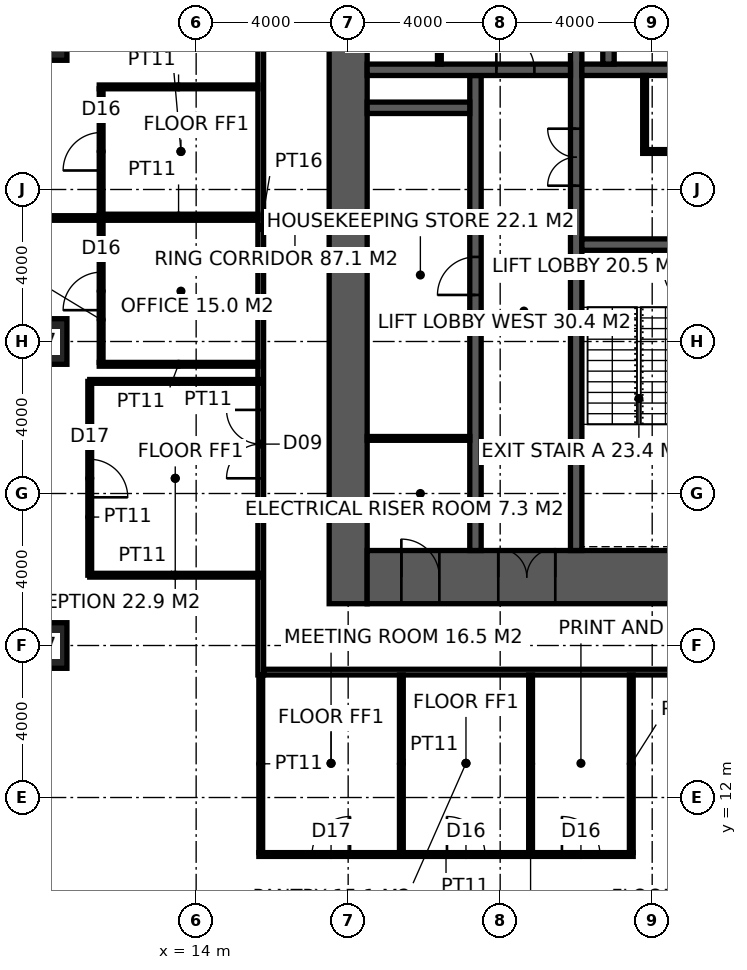
"""IFC4 building model, lengths in metres.
Left out: names, types, materials, properties, quantities, classifications, styles, units other than length and angle.
Written with IfcOpenShell. Run it as: python <this file> out.ifc"""

import sys

from ifc_helpers import new_model, si_unit, direction, frame, frame_2d, origin, origin_2d, place, context, subcontext, project, spatial, rectangle, hollow_rectangle, extrude, element, fill, save


model = new_model("IFC4")
c1 = context("Model", 3, precision=1e-05, world=origin(), true_north=direction((0.0, 1.0)))
c2 = subcontext(c1, "Body", "Model", "MODEL_VIEW")
j1 = project(units=[si_unit("LENGTHUNIT", "METRE"), si_unit("PLANEANGLEUNIT", "RADIAN")], contexts=[c1])
p1 = place(None, origin())
s1 = spatial("IfcSite", under=j1, at=p1, CompositionType="ELEMENT")
p2 = place(p1, origin())
s2 = spatial("IfcBuilding", under=s1, at=p2, CompositionType="ELEMENT")
p3 = place(p2, frame((0.0, 0.0, 19.0)))
s3 = spatial("IfcBuildingStorey", under=s2, at=p3, CompositionType="ELEMENT", Elevation=19.0)
for number, where, z_axis, x_axis in (
    (1, (10.0, 16.0, 0.0), (0.0, 0.0, 1.0), (1.0, 0.0, 0.0)),
    (2, (10.0, 24.0, 0.0), (0.0, 0.0, 1.0), (1.0, 0.0, 0.0)),
    (3, (10.0, 32.0, 0.0), (0.0, 0.0, 1.0), (1.0, 0.0, 0.0)),
):
    element("IfcColumn", number, at=place(p3, frame(where, z_axis=z_axis, x_axis=x_axis)), inside=s3, PredefinedType="COLUMN", context=c2, shape_type="SweptSolid", body=[
        extrude(hollow_rectangle(XDim=1.2, YDim=1.2, WallThickness=0.1, at=origin_2d()), origin(), (0.0, 0.0, 1.0), 4.0),
    ])
p4 = place(p3, frame((18.0, 17.1, -0.15), z_axis=(0.0, 0.0, 1.0), x_axis=(0.0, 1.0, 0.0)))
e4 = element("IfcWall", 4, at=p4, inside=s3, PredefinedType="SHEAR", context=c2, shape_type="SweptSolid", body=[
    extrude(rectangle(XDim=19.8, YDim=1.0, at=frame_2d((9.9, 0.0))), origin(), (0.0, 0.0, 1.0), 4.0),
])
p5 = place(p3, frame((18.5, 17.8, -0.15), z_axis=(0.0, 0.0, 1.0), x_axis=(1.0, 0.0, 0.0)))
e5 = element("IfcWall", 5, at=p5, inside=s3, PredefinedType="SHEAR", context=c2, shape_type="SweptSolid", body=[
    extrude(rectangle(XDim=23.0, YDim=1.4, at=frame_2d((11.5, 0.0))), origin(), (0.0, 0.0, 1.0), 4.0),
])
p6 = place(p5, frame((3.45, 0.0, 0.15)))
e6 = element("IfcOpeningElement", 6, at=p6, cuts=e5, PredefinedType="OPENING", context=c2, shape_type="SweptSolid", body=[
    extrude(rectangle(XDim=1.5, YDim=2.4, at=frame_2d((0.75, 1.2))), frame((0.0, 0.71, 0.0), z_axis=(0.0, -1.0, 0.0), x_axis=(1.0, 0.0, 0.0)), (0.0, 0.0, 1.0), 1.42),
])
p7 = place(p5, frame((17.9, 0.0, 0.15)))
e7 = element("IfcOpeningElement", 7, at=p7, cuts=e5, PredefinedType="OPENING", context=c2, shape_type="SweptSolid", body=[
    extrude(rectangle(XDim=1.5, YDim=2.4, at=frame_2d((0.75, 1.2))), frame((0.0, 0.71, 0.0), z_axis=(0.0, -1.0, 0.0), x_axis=(1.0, 0.0, 0.0)), (0.0, 0.0, 1.0), 1.42),
])
p8 = place(p5, frame((0.9, 0.0, 0.15)))
e8 = element("IfcOpeningElement", 8, at=p8, cuts=e5, PredefinedType="OPENING", context=c2, shape_type="SweptSolid", body=[
    extrude(rectangle(XDim=1.0, YDim=2.2, at=frame_2d((0.5, 1.1))), frame((0.0, 0.71, 0.0), z_axis=(0.0, -1.0, 0.0), x_axis=(1.0, 0.0, 0.0)), (0.0, 0.0, 1.0), 1.42),
])
p9 = place(p3, frame((24.0, 18.5, -0.15), z_axis=(0.0, 0.0, 1.0), x_axis=(0.0, 1.0, 0.0)))
e9 = element("IfcWall", 9, at=p9, inside=s3, PredefinedType="SHEAR", context=c2, shape_type="SweptSolid", body=[
    extrude(rectangle(XDim=17.0, YDim=0.3, at=frame_2d((8.5, 0.0))), origin(), (0.0, 0.0, 1.0), 4.0),
])
p10 = place(p9, frame((9.6, 0.0, 0.15)))
e10 = element("IfcOpeningElement", 10, at=p10, cuts=e9, PredefinedType="OPENING", context=c2, shape_type="SweptSolid", body=[
    extrude(rectangle(XDim=1.5, YDim=2.4, at=frame_2d((0.75, 1.2))), frame((0.0, 0.16, 0.0), z_axis=(0.0, -1.0, 0.0), x_axis=(1.0, 0.0, 0.0)), (0.0, 0.0, 1.0), 0.32),
])
p11 = place(p3, frame((24.15, 26.55, -0.15), z_axis=(0.0, 0.0, 1.0), x_axis=(1.0, 0.0, 0.0)))
e11 = element("IfcWall", 11, at=p11, inside=s3, PredefinedType="SHEAR", context=c2, shape_type="SweptSolid", body=[
    extrude(rectangle(XDim=11.25, YDim=0.3, at=frame_2d((5.625, 0.0))), origin(), (0.0, 0.0, 1.0), 4.0),
])
p12 = place(p11, frame((9.25, 0.0, 0.15)))
e12 = element("IfcOpeningElement", 12, at=p12, cuts=e11, PredefinedType="OPENING", context=c2, shape_type="SweptSolid", body=[
    extrude(rectangle(XDim=1.0, YDim=2.2, at=frame_2d((0.5, 1.1))), frame((0.0, 0.16, 0.0), z_axis=(0.0, -1.0, 0.0), x_axis=(1.0, 0.0, 0.0)), (0.0, 0.0, 1.0), 0.32),
])
p13 = place(p11, frame((4.9, 0.0, 0.15)))
e13 = element("IfcOpeningElement", 13, at=p13, cuts=e11, PredefinedType="OPENING", context=c2, shape_type="SweptSolid", body=[
    extrude(rectangle(XDim=1.5, YDim=2.4, at=frame_2d((0.75, 1.2))), frame((0.0, 0.16, 0.0), z_axis=(0.0, -1.0, 0.0), x_axis=(1.0, 0.0, 0.0)), (0.0, 0.0, 1.0), 0.32),
])
p14 = place(p3, frame((24.15, 31.15, -0.15), z_axis=(0.0, 0.0, 1.0), x_axis=(1.0, 0.0, 0.0)))
e14 = element("IfcWall", 14, at=p14, inside=s3, PredefinedType="SHEAR", context=c2, shape_type="SweptSolid", body=[
    extrude(rectangle(XDim=11.25, YDim=0.3, at=frame_2d((5.625, 0.0))), origin(), (0.0, 0.0, 1.0), 4.0),
])
p15 = place(p14, frame((7.25, 0.0, 0.15)))
e15 = element("IfcOpeningElement", 15, at=p15, cuts=e14, PredefinedType="OPENING", context=c2, shape_type="SweptSolid", body=[
    extrude(rectangle(XDim=1.4, YDim=2.4, at=frame_2d((0.7, 1.2))), frame((0.0, 0.16, 0.0), z_axis=(0.0, -1.0, 0.0), x_axis=(1.0, 0.0, 0.0)), (0.0, 0.0, 1.0), 0.32),
])
p16 = place(p3, frame((21.35, 18.5, -0.15), z_axis=(0.0, 0.0, 1.0), x_axis=(0.0, 1.0, 0.0)))
e16 = element("IfcWall", 16, at=p16, inside=s3, PredefinedType="SHEAR", context=c2, shape_type="SweptSolid", body=[
    extrude(rectangle(XDim=12.5, YDim=0.3, at=frame_2d((6.25, 0.0))), origin(), (0.0, 0.0, 1.0), 4.0),
])
p17 = place(p16, frame((6.725, 0.0, 0.15)))
e17 = element("IfcOpeningElement", 17, at=p17, cuts=e16, PredefinedType="OPENING", context=c2, shape_type="SweptSolid", body=[
    extrude(rectangle(XDim=1.0, YDim=2.2, at=frame_2d((0.5, 1.1))), frame((0.0, 0.16, 0.0), z_axis=(0.0, -1.0, 0.0), x_axis=(1.0, 0.0, 0.0)), (0.0, 0.0, 1.0), 0.32),
])
p18 = place(p3, frame((18.5, 31.15, -0.15), z_axis=(0.0, 0.0, 1.0), x_axis=(1.0, 0.0, 0.0)))
e18 = element("IfcWall", 18, at=p18, inside=s3, PredefinedType="SHEAR", context=c2, shape_type="SweptSolid", body=[
    extrude(rectangle(XDim=5.35, YDim=0.3, at=frame_2d((2.675, 0.0))), origin(), (0.0, 0.0, 1.0), 4.0),
])
p19 = place(p18, frame((3.4, 0.0, 0.15)))
e19 = element("IfcOpeningElement", 19, at=p19, cuts=e18, PredefinedType="OPENING", context=c2, shape_type="SweptSolid", body=[
    extrude(rectangle(XDim=1.0, YDim=2.2, at=frame_2d((0.5, 1.1))), frame((0.0, 0.16, 0.0), z_axis=(0.0, -1.0, 0.0), x_axis=(1.0, 0.0, 0.0)), (0.0, 0.0, 1.0), 0.32),
])
p20 = place(p3, frame((18.5, 30.15, -0.15), z_axis=(0.0, 0.0, 1.0), x_axis=(1.0, 0.0, 0.0)))
e20 = element("IfcWall", 20, at=p20, inside=s3, PredefinedType="SHEAR", context=c2, shape_type="SweptSolid", body=[
    extrude(rectangle(XDim=2.7, YDim=0.3, at=frame_2d((1.35, 0.0))), origin(), (0.0, 0.0, 1.0), 4.0),
])
p21 = place(p3, frame((24.85, 31.3, -0.15), z_axis=(0.0, 0.0, 1.0), x_axis=(0.0, 1.0, 0.0)))
e21 = element("IfcWall", 21, at=p21, inside=s3, PredefinedType="SHEAR", context=c2, shape_type="SweptSolid", body=[
    extrude(rectangle(XDim=4.2, YDim=0.3, at=frame_2d((2.1, 0.0))), origin(), (0.0, 0.0, 1.0), 4.0),
])
p22 = place(p3, frame((20.4, 31.3, 0.0), z_axis=(0.0, 0.0, 1.0), x_axis=(0.0, 1.0, 0.0)))
e22 = element("IfcWall", 22, at=p22, inside=s3, PredefinedType="PARTITIONING", context=c2, shape_type="SweptSolid", body=[
    extrude(rectangle(XDim=4.2, YDim=0.1, at=frame_2d((2.1, 0.0))), origin(), (0.0, 0.0, 1.0), 3.85),
])
p23 = place(p22, frame((1.55, 0.0, 0.0)))
e23 = element("IfcOpeningElement", 23, at=p23, cuts=e22, PredefinedType="OPENING", context=c2, shape_type="SweptSolid", body=[
    extrude(rectangle(XDim=1.0, YDim=2.2, at=frame_2d((0.5, 1.1))), frame((0.0, 0.06, 0.0), z_axis=(0.0, -1.0, 0.0), x_axis=(1.0, 0.0, 0.0)), (0.0, 0.0, 1.0), 0.12),
])
p24 = place(p3, frame((25.75, 29.0, 0.0), z_axis=(0.0, 0.0, 1.0), x_axis=(1.0, 0.0, 0.0)))
e24 = element("IfcWall", 24, at=p24, inside=s3, PredefinedType="PARTITIONING", context=c2, shape_type="SweptSolid", body=[
    extrude(rectangle(XDim=4.7, YDim=0.1, at=frame_2d((2.35, 0.0))), origin(), (0.0, 0.0, 1.0), 3.85),
])
p25 = place(p24, frame((1.85, 0.0, 0.0)))
e25 = element("IfcOpeningElement", 25, at=p25, cuts=e24, PredefinedType="OPENING", context=c2, shape_type="SweptSolid", body=[
    extrude(rectangle(XDim=1.0, YDim=2.2, at=frame_2d((0.5, 1.1))), frame((0.0, 0.06, 0.0), z_axis=(0.0, -1.0, 0.0), x_axis=(1.0, 0.0, 0.0)), (0.0, 0.0, 1.0), 0.12),
])
p26 = place(p3, frame((25.8, 29.05, 0.0), z_axis=(0.0, 0.0, 1.0), x_axis=(0.0, 1.0, 0.0)))
e26 = element("IfcWall", 26, at=p26, inside=s3, PredefinedType="PARTITIONING", context=c2, shape_type="SweptSolid", body=[
    extrude(rectangle(XDim=1.95, YDim=0.1, at=frame_2d((0.975, 0.0))), origin(), (0.0, 0.0, 1.0), 3.85),
])
p27 = place(p3, frame((18.5, 21.45, 0.0), z_axis=(0.0, 0.0, 1.0), x_axis=(1.0, 0.0, 0.0)))
e27 = element("IfcWall", 27, at=p27, inside=s3, PredefinedType="PARTITIONING", context=c2, shape_type="SweptSolid", body=[
    extrude(rectangle(XDim=2.7, YDim=0.1, at=frame_2d((1.35, 0.0))), origin(), (0.0, 0.0, 1.0), 3.85),
])
p28 = place(p3, frame((15.7, 15.225, 0.0), z_axis=(0.0, 0.0, 1.0), x_axis=(0.0, 1.0, 0.0)))
e28 = element("IfcWall", 28, at=p28, inside=s3, PredefinedType="PARTITIONING", context=c2, shape_type="SweptSolid", body=[
    extrude(rectangle(XDim=23.55, YDim=0.15, at=frame_2d((11.775, 0.0))), origin(), (0.0, 0.0, 1.0), 3.85),
])
p29 = place(p28, frame((5.175, 0.0, 0.0)))
e29 = element("IfcOpeningElement", 29, at=p29, cuts=e28, PredefinedType="OPENING", context=c2, shape_type="SweptSolid", body=[
    extrude(rectangle(XDim=1.8, YDim=2.4, at=frame_2d((0.9, 1.2))), frame((0.0, 0.085, 0.0), z_axis=(0.0, -1.0, 0.0), x_axis=(1.0, 0.0, 0.0)), (0.0, 0.0, 1.0), 0.17),
])
p30 = place(p28, frame((16.825, 0.0, 0.0)))
e30 = element("IfcOpeningElement", 30, at=p30, cuts=e28, PredefinedType="OPENING", context=c2, shape_type="SweptSolid", body=[
    extrude(rectangle(XDim=1.8, YDim=2.4, at=frame_2d((0.9, 1.2))), frame((0.0, 0.085, 0.0), z_axis=(0.0, -1.0, 0.0), x_axis=(1.0, 0.0, 0.0)), (0.0, 0.0, 1.0), 0.17),
])
p31 = place(p3, frame((15.775, 15.3, 0.0), z_axis=(0.0, 0.0, 1.0), x_axis=(1.0, 0.0, 0.0)))
e31 = element("IfcWall", 31, at=p31, inside=s3, PredefinedType="PARTITIONING", context=c2, shape_type="SweptSolid", body=[
    extrude(rectangle(XDim=28.45, YDim=0.15, at=frame_2d((14.225, 0.0))), origin(), (0.0, 0.0, 1.0), 3.85),
])
p32 = place(p3, frame((-1.7, 27.25, 0.0), z_axis=(0.0, 0.0, 1.0), x_axis=(1.0, 0.0, 0.0)))
e32 = element("IfcWall", 32, at=p32, inside=s3, PredefinedType="PARTITIONING", context=c2, shape_type="SweptSolid", body=[
    extrude(rectangle(XDim=17.325, YDim=0.12, at=frame_2d((8.663, 0.0))), origin(), (0.0, 0.0, 1.0), 3.85),
])
p33 = place(p3, frame((15.65, 10.5, 0.0), z_axis=(0.0, 0.0, 1.0), x_axis=(1.0, 0.0, 0.0)))
e33 = element("IfcWall", 33, at=p33, inside=s3, PredefinedType="PARTITIONING", context=c2, shape_type="SweptSolid", body=[
    extrude(rectangle(XDim=9.85, YDim=0.1, at=frame_2d((4.925, 0.0))), origin(), (0.0, 0.0, 1.0), 3.85),
])
p34 = place(p33, frame((1.4, 0.0, 0.0)))
e34 = element("IfcOpeningElement", 34, at=p34, cuts=e33, PredefinedType="OPENING", context=c2, shape_type="SweptSolid", body=[
    extrude(rectangle(XDim=1.0, YDim=2.2, at=frame_2d((0.5, 1.1))), frame((0.0, 0.06, 0.0), z_axis=(0.0, -1.0, 0.0), x_axis=(1.0, 0.0, 0.0)), (0.0, 0.0, 1.0), 0.12),
])
p35 = place(p33, frame((4.95, 0.0, 0.0)))
e35 = element("IfcOpeningElement", 35, at=p35, cuts=e33, PredefinedType="OPENING", context=c2, shape_type="SweptSolid", body=[
    extrude(rectangle(XDim=1.0, YDim=2.2, at=frame_2d((0.5, 1.1))), frame((0.0, 0.06, 0.0), z_axis=(0.0, -1.0, 0.0), x_axis=(1.0, 0.0, 0.0)), (0.0, 0.0, 1.0), 0.12),
])
p36 = place(p33, frame((7.975, 0.0, 0.0)))
e36 = element("IfcOpeningElement", 36, at=p36, cuts=e33, PredefinedType="OPENING", context=c2, shape_type="SweptSolid", body=[
    extrude(rectangle(XDim=1.0, YDim=2.2, at=frame_2d((0.5, 1.1))), frame((0.0, 0.06, 0.0), z_axis=(0.0, -1.0, 0.0), x_axis=(1.0, 0.0, 0.0)), (0.0, 0.0, 1.0), 0.12),
])
for number, where, z_axis, x_axis in (
    (37, (11.45, 23.4, 0.0), (0.0, 0.0, 1.0), (1.0, 0.0, 0.0)),
    (38, (11.45, 27.3, 0.0), (0.0, 0.0, 1.0), (1.0, 0.0, 0.0)),
    (39, (11.45, 30.7, 0.0), (0.0, 0.0, 1.0), (1.0, 0.0, 0.0)),
):
    element("IfcWall", number, at=place(p3, frame(where, z_axis=z_axis, x_axis=x_axis)), inside=s3, PredefinedType="PARTITIONING", context=c2, shape_type="SweptSolid", body=[
        extrude(rectangle(XDim=4.175, YDim=0.1, at=frame_2d((2.087, 0.0))), origin(), (0.0, 0.0, 1.0), 3.85),
    ])
p37 = place(p3, frame((11.5, 23.45, 0.0), z_axis=(0.0, 0.0, 1.0), x_axis=(0.0, 1.0, 0.0)))
e40 = element("IfcWall", 40, at=p37, inside=s3, PredefinedType="PARTITIONING", context=c2, shape_type="SweptSolid", body=[
    extrude(rectangle(XDim=3.739, YDim=0.1, at=frame_2d((1.87, 0.0))), origin(), (0.0, 0.0, 1.0), 3.85),
])
p38 = place(p37, frame((1.375, 0.0, 0.0)))
e41 = element("IfcOpeningElement", 41, at=p38, cuts=e40, PredefinedType="OPENING", context=c2, shape_type="SweptSolid", body=[
    extrude(rectangle(XDim=1.0, YDim=2.2, at=frame_2d((0.5, 1.1))), frame((0.0, 0.06, 0.0), z_axis=(0.0, -1.0, 0.0), x_axis=(1.0, 0.0, 0.0)), (0.0, 0.0, 1.0), 0.12),
])
p39 = place(p3, frame((11.5, 27.35, 0.0), z_axis=(0.0, 0.0, 1.0), x_axis=(0.0, 1.0, 0.0)))
e42 = element("IfcWall", 42, at=p39, inside=s3, PredefinedType="PARTITIONING", context=c2, shape_type="SweptSolid", body=[
    extrude(rectangle(XDim=3.3, YDim=0.1, at=frame_2d((1.65, 0.0))), origin(), (0.0, 0.0, 1.0), 3.85),
])
p40 = place(p39, frame((1.15, 0.0, 0.0)))
e43 = element("IfcOpeningElement", 43, at=p40, cuts=e42, PredefinedType="OPENING", context=c2, shape_type="SweptSolid", body=[
    extrude(rectangle(XDim=1.0, YDim=2.2, at=frame_2d((0.5, 1.1))), frame((0.0, 0.06, 0.0), z_axis=(0.0, -1.0, 0.0), x_axis=(1.0, 0.0, 0.0)), (0.0, 0.0, 1.0), 0.12),
])
for number, where, z_axis, x_axis in (
    (44, (15.7, 10.55, 0.0), (0.0, 0.0, 1.0), (0.0, 1.0, 0.0)),
    (45, (19.4, 10.55, 0.0), (0.0, 0.0, 1.0), (0.0, 1.0, 0.0)),
    (46, (22.8, 10.55, 0.0), (0.0, 0.0, 1.0), (0.0, 1.0, 0.0)),
    (47, (25.45, 10.55, 0.0), (0.0, 0.0, 1.0), (0.0, 1.0, 0.0)),
):
    element("IfcWall", number, at=place(p3, frame(where, z_axis=z_axis, x_axis=x_axis)), inside=s3, PredefinedType="PARTITIONING", context=c2, shape_type="SweptSolid", body=[
        extrude(rectangle(XDim=4.675, YDim=0.1, at=frame_2d((2.337, 0.0))), origin(), (0.0, 0.0, 1.0), 3.85),
    ])
p41 = place(p3, frame((15.7, 22.95, 0.0), z_axis=(0.0, 0.0, 1.0), x_axis=(-1.0, 0.0, 0.0)))
e48 = element("IfcWall", 48, at=p41, inside=s3, PredefinedType="PARTITIONING", context=c2, shape_type="SweptSolid", body=[
    extrude(rectangle(XDim=4.5, YDim=0.1, at=frame_2d((2.25, 0.0))), origin(), (0.0, 0.0, 1.0), 3.85),
])
p42 = place(p3, frame((11.2, 22.95, 0.0), z_axis=(0.0, 0.0, 1.0), x_axis=(0.0, -1.0, 0.0)))
e49 = element("IfcWall", 49, at=p42, inside=s3, PredefinedType="PARTITIONING", context=c2, shape_type="SweptSolid", body=[
    extrude(rectangle(XDim=5.1, YDim=0.1, at=frame_2d((2.55, 0.0))), origin(), (0.0, 0.0, 1.0), 3.85),
])
p43 = place(p42, frame((2.05, 0.0, 0.0)))
e50 = element("IfcOpeningElement", 50, at=p43, cuts=e49, PredefinedType="OPENING", context=c2, shape_type="SweptSolid", body=[
    extrude(rectangle(XDim=1.0, YDim=2.2, at=frame_2d((0.5, 1.1))), frame((0.0, 0.06, 0.0), z_axis=(0.0, -1.0, 0.0), x_axis=(1.0, 0.0, 0.0)), (0.0, 0.0, 1.0), 0.12),
])
p44 = place(p3, frame((11.2, 17.85, 0.0), z_axis=(0.0, 0.0, 1.0), x_axis=(1.0, 0.0, 0.0)))
e51 = element("IfcWall", 51, at=p44, inside=s3, PredefinedType="PARTITIONING", context=c2, shape_type="SweptSolid", body=[
    extrude(rectangle(XDim=4.5, YDim=0.1, at=frame_2d((2.25, 0.0))), origin(), (0.0, 0.0, 1.0), 3.85),
])
p45 = place(p10, origin())
e52 = element("IfcDoor", 52, at=p45, inside=s3, OperationType="DOUBLE_DOOR_DOUBLE_SWING", PredefinedType="DOOR", context=c2, shape_type="SweptSolid", body=[
    extrude(rectangle(XDim=1.5, YDim=2.4, at=frame_2d((0.75, 1.2))), frame((0.0, 0.025, 0.0), z_axis=(0.0, -1.0, 0.0), x_axis=(1.0, 0.0, 0.0)), (0.0, 0.0, 1.0), 0.05),
])
fill(e10, e52)
p46 = place(p19, origin())
e53 = element("IfcDoor", 53, at=p46, inside=s3, OperationType="SINGLE_SWING_LEFT", PredefinedType="DOOR", context=c2, shape_type="SweptSolid", body=[
    extrude(rectangle(XDim=1.0, YDim=2.2, at=frame_2d((0.5, 1.1))), frame((0.0, 0.025, 0.0), z_axis=(0.0, -1.0, 0.0), x_axis=(1.0, 0.0, 0.0)), (0.0, 0.0, 1.0), 0.05),
])
fill(e19, e53)
p47 = place(p17, origin())
e54 = element("IfcDoor", 54, at=p47, inside=s3, OperationType="SINGLE_SWING_LEFT", PredefinedType="DOOR", context=c2, shape_type="SweptSolid", body=[
    extrude(rectangle(XDim=1.0, YDim=2.2, at=frame_2d((0.5, 1.1))), frame((0.0, 0.025, 0.0), z_axis=(0.0, -1.0, 0.0), x_axis=(1.0, 0.0, 0.0)), (0.0, 0.0, 1.0), 0.05),
])
fill(e17, e54)
p48 = place(p6, origin())
e55 = element("IfcDoor", 55, at=p48, inside=s3, OperationType="DOUBLE_DOOR_DOUBLE_SWING", PredefinedType="DOOR", context=c2, shape_type="SweptSolid", body=[
    extrude(rectangle(XDim=1.5, YDim=2.4, at=frame_2d((0.75, 1.2))), frame((0.0, 0.025, 0.0), z_axis=(0.0, -1.0, 0.0), x_axis=(1.0, 0.0, 0.0)), (0.0, 0.0, 1.0), 0.05),
])
fill(e6, e55)
p49 = place(p8, origin())
e56 = element("IfcDoor", 56, at=p49, inside=s3, OperationType="SINGLE_SWING_LEFT", PredefinedType="DOOR", context=c2, shape_type="SweptSolid", body=[
    extrude(rectangle(XDim=1.0, YDim=2.2, at=frame_2d((0.5, 1.1))), frame((0.0, 0.025, 0.0), z_axis=(0.0, -1.0, 0.0), x_axis=(1.0, 0.0, 0.0)), (0.0, 0.0, 1.0), 0.05),
])
fill(e8, e56)
p50 = place(p29, origin())
e57 = element("IfcDoor", 57, at=p50, inside=s3, OperationType="DOUBLE_DOOR_DOUBLE_SWING", PredefinedType="DOOR", context=c2, shape_type="SweptSolid", body=[
    extrude(rectangle(XDim=1.8, YDim=2.4, at=frame_2d((0.9, 1.2))), frame((0.0, 0.025, 0.0), z_axis=(0.0, -1.0, 0.0), x_axis=(1.0, 0.0, 0.0)), (0.0, 0.0, 1.0), 0.05),
])
fill(e29, e57)
p51 = place(p34, origin())
e58 = element("IfcDoor", 58, at=p51, inside=s3, OperationType="SINGLE_SWING_RIGHT", PredefinedType="DOOR", context=c2, shape_type="SweptSolid", body=[
    extrude(rectangle(XDim=1.0, YDim=2.2, at=frame_2d((0.5, 1.1))), frame((0.0, 0.025, 0.0), z_axis=(0.0, -1.0, 0.0), x_axis=(1.0, 0.0, 0.0)), (0.0, 0.0, 1.0), 0.05),
])
fill(e34, e58)
p52 = place(p35, origin())
e59 = element("IfcDoor", 59, at=p52, inside=s3, OperationType="SINGLE_SWING_LEFT", PredefinedType="DOOR", context=c2, shape_type="SweptSolid", body=[
    extrude(rectangle(XDim=1.0, YDim=2.2, at=frame_2d((0.5, 1.1))), frame((0.0, 0.025, 0.0), z_axis=(0.0, -1.0, 0.0), x_axis=(1.0, 0.0, 0.0)), (0.0, 0.0, 1.0), 0.05),
])
fill(e35, e59)
p53 = place(p36, origin())
e60 = element("IfcDoor", 60, at=p53, inside=s3, OperationType="SINGLE_SWING_LEFT", PredefinedType="DOOR", context=c2, shape_type="SweptSolid", body=[
    extrude(rectangle(XDim=1.0, YDim=2.2, at=frame_2d((0.5, 1.1))), frame((0.0, 0.025, 0.0), z_axis=(0.0, -1.0, 0.0), x_axis=(1.0, 0.0, 0.0)), (0.0, 0.0, 1.0), 0.05),
])
fill(e36, e60)
p54 = place(p38, origin())
e61 = element("IfcDoor", 61, at=p54, inside=s3, OperationType="SINGLE_SWING_LEFT", PredefinedType="DOOR", context=c2, shape_type="SweptSolid", body=[
    extrude(rectangle(XDim=1.0, YDim=2.2, at=frame_2d((0.5, 1.1))), frame((0.0, 0.025, 0.0), z_axis=(0.0, -1.0, 0.0), x_axis=(1.0, 0.0, 0.0)), (0.0, 0.0, 1.0), 0.05),
])
fill(e41, e61)
p55 = place(p40, origin())
e62 = element("IfcDoor", 62, at=p55, inside=s3, OperationType="SINGLE_SWING_LEFT", PredefinedType="DOOR", context=c2, shape_type="SweptSolid", body=[
    extrude(rectangle(XDim=1.0, YDim=2.2, at=frame_2d((0.5, 1.1))), frame((0.0, 0.025, 0.0), z_axis=(0.0, -1.0, 0.0), x_axis=(1.0, 0.0, 0.0)), (0.0, 0.0, 1.0), 0.05),
])
fill(e43, e62)
p56 = place(p43, origin())
e63 = element("IfcDoor", 63, at=p56, inside=s3, OperationType="SINGLE_SWING_RIGHT", PredefinedType="DOOR", context=c2, shape_type="SweptSolid", body=[
    extrude(rectangle(XDim=1.0, YDim=2.2, at=frame_2d((0.5, 1.1))), frame((0.0, 0.025, 0.0), z_axis=(0.0, -1.0, 0.0), x_axis=(1.0, 0.0, 0.0)), (0.0, 0.0, 1.0), 0.05),
])
fill(e50, e63)
save(model, sys.argv[1])
